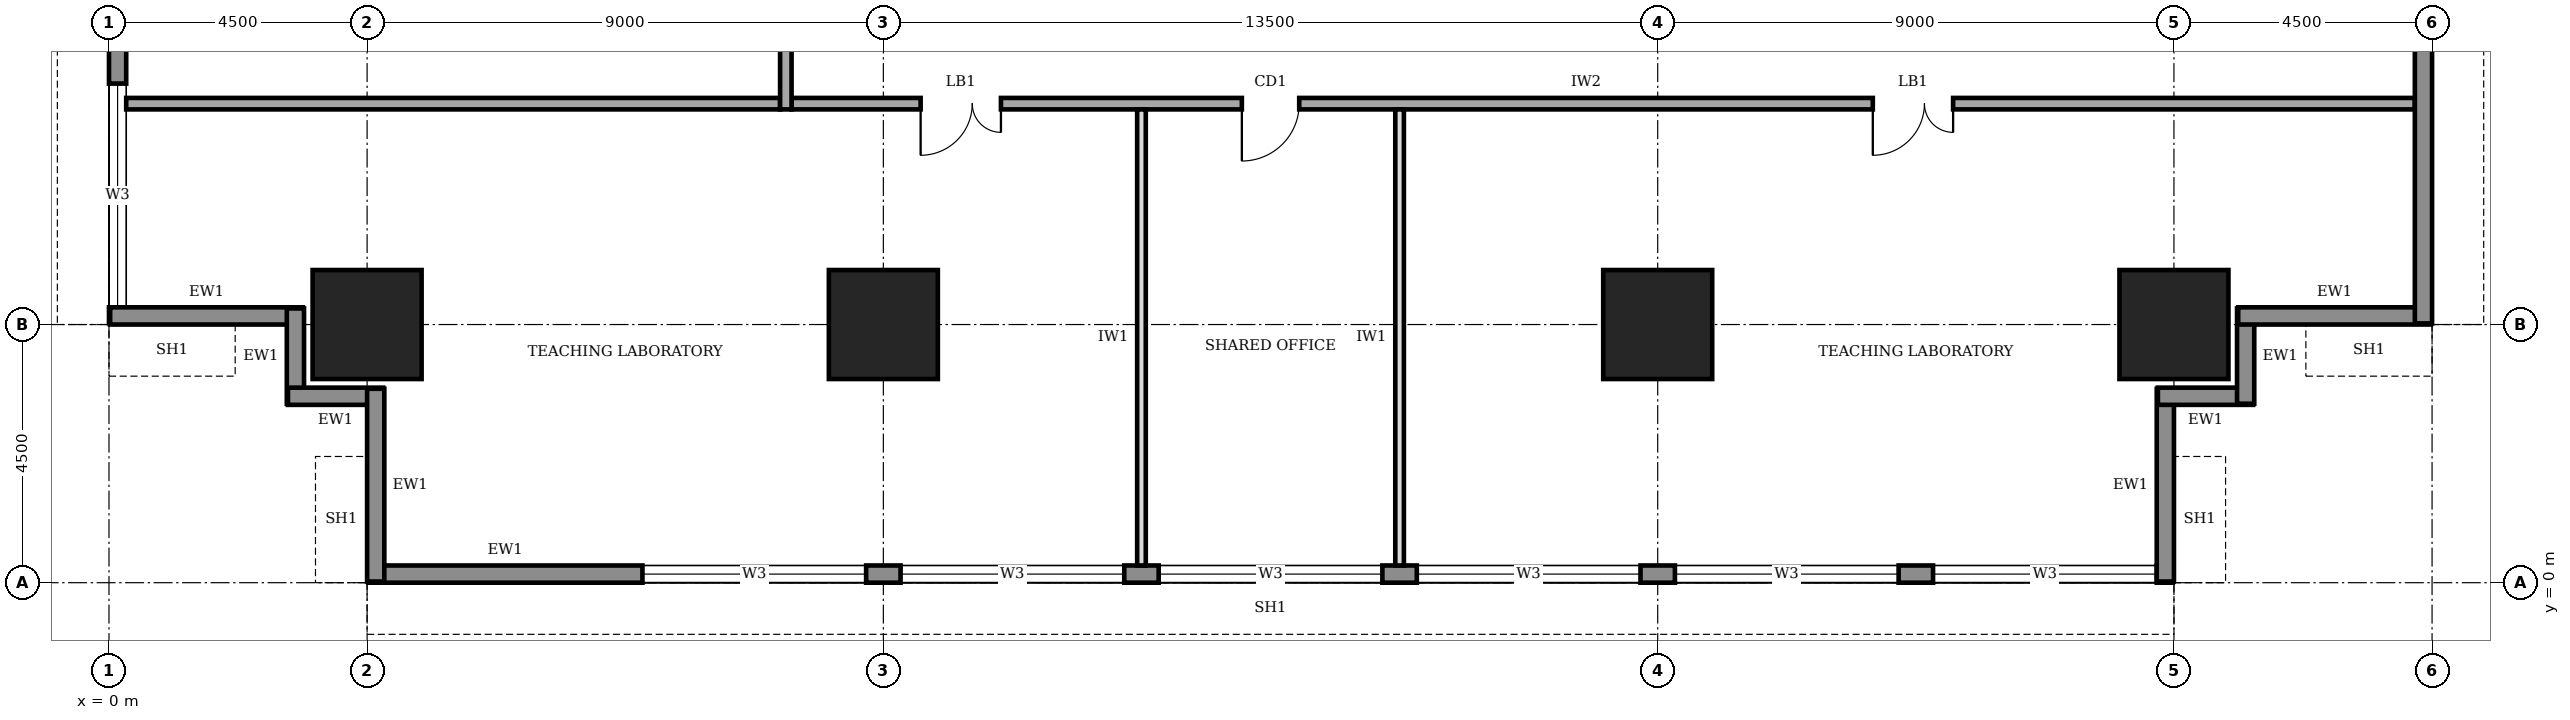
"""IFC4 building model, lengths in metres.
Left out: names, types, materials, properties, quantities, classifications, styles, units other than length and angle.
Written with IfcOpenShell. Run it as: python <this file> out.ifc"""

import sys

from ifc_helpers import new_model, si_unit, direction, frame, frame_2d, origin, origin_2d, place, context, subcontext, project, spatial, rectangle, extrude, element, fill, save


model = new_model("IFC4")
c1 = context("Model", 3, precision=1e-05, world=origin(), true_north=direction((0.0, 1.0)))
c2 = subcontext(c1, "Body", "Model", "MODEL_VIEW")
j1 = project(units=[si_unit("LENGTHUNIT", "METRE"), si_unit("PLANEANGLEUNIT", "RADIAN")], contexts=[c1])
p1 = place(None, origin())
s1 = spatial("IfcSite", under=j1, at=p1, CompositionType="ELEMENT")
p2 = place(p1, origin())
s2 = spatial("IfcBuilding", under=s1, at=p2, CompositionType="ELEMENT")
p3 = place(p2, frame((0.0, 0.0, 101.0)))
s3 = spatial("IfcBuildingStorey", under=s2, at=p3, CompositionType="ELEMENT", Elevation=101.0)
for number, where, z_axis, x_axis in (
    (1, (4.5, 4.5, 0.0), (0.0, 0.0, 1.0), (1.0, 0.0, 0.0)),
    (2, (13.5, 4.5, 0.0), (0.0, 0.0, 1.0), (1.0, 0.0, 0.0)),
    (3, (27.0, 4.5, 0.0), (0.0, 0.0, 1.0), (1.0, 0.0, 0.0)),
    (4, (36.0, 4.5, 0.0), (0.0, 0.0, 1.0), (1.0, 0.0, 0.0)),
):
    element("IfcColumn", number, at=place(p3, frame(where, z_axis=z_axis, x_axis=x_axis)), inside=s3, PredefinedType="COLUMN", context=c2, shape_type="SweptSolid", body=[
        extrude(rectangle(XDim=1.9, YDim=1.9, at=origin_2d()), origin(), (0.0, 0.0, 1.0), 4.0),
    ])
p4 = place(p3, frame((4.52, 0.15, 0.0), z_axis=(0.0, 0.0, 1.0), x_axis=(1.0, 0.0, 0.0)))
e5 = element("IfcWall", 5, at=p4, inside=s3, PredefinedType="STANDARD", context=c2, shape_type="SweptSolid", body=[
    extrude(rectangle(XDim=31.46, YDim=0.3, at=frame_2d((15.73, 0.0))), origin(), (0.0, 0.0, 1.0), 3.75),
])
p5 = place(p4, frame((4.78, 0.0, 0.95)))
e6 = element("IfcOpeningElement", 6, at=p5, cuts=e5, PredefinedType="OPENING", context=c2, shape_type="SweptSolid", body=[
    extrude(rectangle(XDim=3.9, YDim=1.8, at=frame_2d((1.95, 0.9))), frame((0.0, 0.16, 0.0), z_axis=(0.0, -1.0, 0.0), x_axis=(1.0, 0.0, 0.0)), (0.0, 0.0, 1.0), 0.32),
])
p6 = place(p4, frame((9.28, 0.0, 0.95)))
e7 = element("IfcOpeningElement", 7, at=p6, cuts=e5, PredefinedType="OPENING", context=c2, shape_type="SweptSolid", body=[
    extrude(rectangle(XDim=3.9, YDim=1.8, at=frame_2d((1.95, 0.9))), frame((0.0, 0.16, 0.0), z_axis=(0.0, -1.0, 0.0), x_axis=(1.0, 0.0, 0.0)), (0.0, 0.0, 1.0), 0.32),
])
p7 = place(p4, frame((13.78, 0.0, 0.95)))
e8 = element("IfcOpeningElement", 8, at=p7, cuts=e5, PredefinedType="OPENING", context=c2, shape_type="SweptSolid", body=[
    extrude(rectangle(XDim=3.9, YDim=1.8, at=frame_2d((1.95, 0.9))), frame((0.0, 0.16, 0.0), z_axis=(0.0, -1.0, 0.0), x_axis=(1.0, 0.0, 0.0)), (0.0, 0.0, 1.0), 0.32),
])
p8 = place(p4, frame((18.28, 0.0, 0.95)))
e9 = element("IfcOpeningElement", 9, at=p8, cuts=e5, PredefinedType="OPENING", context=c2, shape_type="SweptSolid", body=[
    extrude(rectangle(XDim=3.9, YDim=1.8, at=frame_2d((1.95, 0.9))), frame((0.0, 0.16, 0.0), z_axis=(0.0, -1.0, 0.0), x_axis=(1.0, 0.0, 0.0)), (0.0, 0.0, 1.0), 0.32),
])
p9 = place(p4, frame((22.78, 0.0, 0.95)))
e10 = element("IfcOpeningElement", 10, at=p9, cuts=e5, PredefinedType="OPENING", context=c2, shape_type="SweptSolid", body=[
    extrude(rectangle(XDim=3.9, YDim=1.8, at=frame_2d((1.95, 0.9))), frame((0.0, 0.16, 0.0), z_axis=(0.0, -1.0, 0.0), x_axis=(1.0, 0.0, 0.0)), (0.0, 0.0, 1.0), 0.32),
])
p10 = place(p4, frame((27.28, 0.0, 0.95)))
e11 = element("IfcOpeningElement", 11, at=p10, cuts=e5, PredefinedType="OPENING", context=c2, shape_type="SweptSolid", body=[
    extrude(rectangle(XDim=3.9, YDim=1.8, at=frame_2d((1.95, 0.9))), frame((0.0, 0.16, 0.0), z_axis=(0.0, -1.0, 0.0), x_axis=(1.0, 0.0, 0.0)), (0.0, 0.0, 1.0), 0.32),
])
p11 = place(p3, frame((35.85, 0.02, 0.0), z_axis=(0.0, 0.0, 1.0), x_axis=(0.0, 1.0, 0.0)))
e12 = element("IfcWall", 12, at=p11, inside=s3, PredefinedType="STANDARD", context=c2, shape_type="SweptSolid", body=[
    extrude(rectangle(XDim=3.36, YDim=0.3, at=frame_2d((1.68, 0.0))), origin(), (0.0, 0.0, 1.0), 2.85),
])
for number, where, z_axis, x_axis in (
    (13, (35.72, 3.25, 0.0), (0.0, 0.0, 1.0), (1.0, 0.0, 0.0)),
    (14, (37.25, 3.12, 0.0), (0.0, 0.0, 1.0), (0.0, 1.0, 0.0)),
):
    element("IfcWall", number, at=place(p3, frame(where, z_axis=z_axis, x_axis=x_axis)), inside=s3, PredefinedType="STANDARD", context=c2, shape_type="SweptSolid", body=[
        extrude(rectangle(XDim=1.66, YDim=0.3, at=frame_2d((0.83, 0.0))), origin(), (0.0, 0.0, 1.0), 3.75),
    ])
p12 = place(p3, frame((37.12, 4.65, 0.0), z_axis=(0.0, 0.0, 1.0), x_axis=(1.0, 0.0, 0.0)))
e15 = element("IfcWall", 15, at=p12, inside=s3, PredefinedType="STANDARD", context=c2, shape_type="SweptSolid", body=[
    extrude(rectangle(XDim=3.36, YDim=0.3, at=frame_2d((1.68, 0.0))), origin(), (0.0, 0.0, 1.0), 2.85),
])
p13 = place(p3, frame((40.35, 4.52, 0.0), z_axis=(0.0, 0.0, 1.0), x_axis=(0.0, 1.0, 0.0)))
e16 = element("IfcWall", 16, at=p13, inside=s3, PredefinedType="STANDARD", context=c2, shape_type="SweptSolid", body=[
    extrude(rectangle(XDim=6.73, YDim=0.3, at=frame_2d((3.365, 0.0))), origin(), (0.0, 0.0, 1.0), 3.75),
])
p14 = place(p3, frame((0.15, 35.98, 0.0), z_axis=(0.0, 0.0, 1.0), x_axis=(0.0, -1.0, 0.0)))
e17 = element("IfcWall", 17, at=p14, inside=s3, PredefinedType="STANDARD", context=c2, shape_type="SweptSolid", body=[
    extrude(rectangle(XDim=31.46, YDim=0.3, at=frame_2d((15.73, 0.0))), origin(), (0.0, 0.0, 1.0), 3.75),
])
p15 = place(p14, frame((27.28, 0.0, 0.95)))
e18 = element("IfcOpeningElement", 18, at=p15, cuts=e17, PredefinedType="OPENING", context=c2, shape_type="SweptSolid", body=[
    extrude(rectangle(XDim=3.9, YDim=1.8, at=frame_2d((1.95, 0.9))), frame((0.0, 0.16, 0.0), z_axis=(0.0, -1.0, 0.0), x_axis=(1.0, 0.0, 0.0)), (0.0, 0.0, 1.0), 0.32),
])
p16 = place(p14, frame((22.78, 0.0, 0.95)))
e19 = element("IfcOpeningElement", 19, at=p16, cuts=e17, PredefinedType="OPENING", context=c2, shape_type="SweptSolid", body=[
    extrude(rectangle(XDim=3.9, YDim=1.8, at=frame_2d((1.95, 0.9))), frame((0.0, 0.16, 0.0), z_axis=(0.0, -1.0, 0.0), x_axis=(1.0, 0.0, 0.0)), (0.0, 0.0, 1.0), 0.32),
])
p17 = place(p14, frame((18.28, 0.0, 0.95)))
e20 = element("IfcOpeningElement", 20, at=p17, cuts=e17, PredefinedType="OPENING", context=c2, shape_type="SweptSolid", body=[
    extrude(rectangle(XDim=3.9, YDim=1.8, at=frame_2d((1.95, 0.9))), frame((0.0, 0.16, 0.0), z_axis=(0.0, -1.0, 0.0), x_axis=(1.0, 0.0, 0.0)), (0.0, 0.0, 1.0), 0.32),
])
p18 = place(p14, frame((13.78, 0.0, 0.95)))
e21 = element("IfcOpeningElement", 21, at=p18, cuts=e17, PredefinedType="OPENING", context=c2, shape_type="SweptSolid", body=[
    extrude(rectangle(XDim=3.9, YDim=1.8, at=frame_2d((1.95, 0.9))), frame((0.0, 0.16, 0.0), z_axis=(0.0, -1.0, 0.0), x_axis=(1.0, 0.0, 0.0)), (0.0, 0.0, 1.0), 0.32),
])
p19 = place(p14, frame((9.28, 0.0, 0.95)))
e22 = element("IfcOpeningElement", 22, at=p19, cuts=e17, PredefinedType="OPENING", context=c2, shape_type="SweptSolid", body=[
    extrude(rectangle(XDim=3.9, YDim=1.8, at=frame_2d((1.95, 0.9))), frame((0.0, 0.16, 0.0), z_axis=(0.0, -1.0, 0.0), x_axis=(1.0, 0.0, 0.0)), (0.0, 0.0, 1.0), 0.32),
])
p20 = place(p14, frame((4.78, 0.0, 0.95)))
e23 = element("IfcOpeningElement", 23, at=p20, cuts=e17, PredefinedType="OPENING", context=c2, shape_type="SweptSolid", body=[
    extrude(rectangle(XDim=3.9, YDim=1.8, at=frame_2d((1.95, 0.9))), frame((0.0, 0.16, 0.0), z_axis=(0.0, -1.0, 0.0), x_axis=(1.0, 0.0, 0.0)), (0.0, 0.0, 1.0), 0.32),
])
p21 = place(p3, frame((0.02, 4.65, 0.0), z_axis=(0.0, 0.0, 1.0), x_axis=(1.0, 0.0, 0.0)))
e24 = element("IfcWall", 24, at=p21, inside=s3, PredefinedType="STANDARD", context=c2, shape_type="SweptSolid", body=[
    extrude(rectangle(XDim=3.36, YDim=0.3, at=frame_2d((1.68, 0.0))), origin(), (0.0, 0.0, 1.0), 2.85),
])
for number, where, z_axis, x_axis in (
    (25, (3.25, 4.78, 0.0), (0.0, 0.0, 1.0), (0.0, -1.0, 0.0)),
    (26, (3.12, 3.25, 0.0), (0.0, 0.0, 1.0), (1.0, 0.0, 0.0)),
):
    element("IfcWall", number, at=place(p3, frame(where, z_axis=z_axis, x_axis=x_axis)), inside=s3, PredefinedType="STANDARD", context=c2, shape_type="SweptSolid", body=[
        extrude(rectangle(XDim=1.66, YDim=0.3, at=frame_2d((0.83, 0.0))), origin(), (0.0, 0.0, 1.0), 3.75),
    ])
p22 = place(p3, frame((4.65, 3.38, 0.0), z_axis=(0.0, 0.0, 1.0), x_axis=(0.0, -1.0, 0.0)))
e27 = element("IfcWall", 27, at=p22, inside=s3, PredefinedType="STANDARD", context=c2, shape_type="SweptSolid", body=[
    extrude(rectangle(XDim=3.36, YDim=0.3, at=frame_2d((1.68, 0.0))), origin(), (0.0, 0.0, 1.0), 2.85),
])
p23 = place(p3, frame((11.9, 8.35, 0.0), z_axis=(0.0, 0.0, 1.0), x_axis=(1.0, 0.0, 0.0)))
e28 = element("IfcWall", 28, at=p23, inside=s3, PredefinedType="SOLIDWALL", context=c2, shape_type="SweptSolid", body=[
    extrude(rectangle(XDim=28.3, YDim=0.2, at=frame_2d((14.15, 0.0))), origin(), (0.0, 0.0, 1.0), 3.75),
])
p24 = place(p23, frame((2.25, 0.0, 0.0)))
e29 = element("IfcOpeningElement", 29, at=p24, cuts=e28, PredefinedType="OPENING", context=c2, shape_type="SweptSolid", body=[
    extrude(rectangle(XDim=1.4, YDim=2.1, at=frame_2d((0.7, 1.05))), frame((0.0, 0.11, 0.0), z_axis=(0.0, -1.0, 0.0), x_axis=(1.0, 0.0, 0.0)), (0.0, 0.0, 1.0), 0.22),
])
p25 = place(p23, frame((7.85, 0.0, 0.0)))
e30 = element("IfcOpeningElement", 30, at=p25, cuts=e28, PredefinedType="OPENING", context=c2, shape_type="SweptSolid", body=[
    extrude(rectangle(XDim=1.0, YDim=2.1, at=frame_2d((0.5, 1.05))), frame((0.0, 0.11, 0.0), z_axis=(0.0, -1.0, 0.0), x_axis=(1.0, 0.0, 0.0)), (0.0, 0.0, 1.0), 0.22),
])
p26 = place(p23, frame((18.85, 0.0, 0.0)))
e31 = element("IfcOpeningElement", 31, at=p26, cuts=e28, PredefinedType="OPENING", context=c2, shape_type="SweptSolid", body=[
    extrude(rectangle(XDim=1.4, YDim=2.1, at=frame_2d((0.7, 1.05))), frame((0.0, 0.11, 0.0), z_axis=(0.0, -1.0, 0.0), x_axis=(1.0, 0.0, 0.0)), (0.0, 0.0, 1.0), 0.22),
])
p27 = place(p3, frame((11.8, 32.05, 0.0), z_axis=(0.0, 0.0, 1.0), x_axis=(0.0, -1.0, 0.0)))
e32 = element("IfcWall", 32, at=p27, inside=s3, PredefinedType="SOLIDWALL", context=c2, shape_type="SweptSolid", body=[
    extrude(rectangle(XDim=23.8, YDim=0.2, at=frame_2d((11.9, 0.0))), origin(), (0.0, 0.0, 1.0), 3.75),
])
p28 = place(p27, frame((20.675, 0.0, 0.0)))
e33 = element("IfcOpeningElement", 33, at=p28, cuts=e32, PredefinedType="OPENING", context=c2, shape_type="SweptSolid", body=[
    extrude(rectangle(XDim=1.0, YDim=2.1, at=frame_2d((0.5, 1.05))), frame((0.0, 0.11, 0.0), z_axis=(0.0, -1.0, 0.0), x_axis=(1.0, 0.0, 0.0)), (0.0, 0.0, 1.0), 0.22),
])
p29 = place(p27, frame((16.2, 0.0, 0.0)))
e34 = element("IfcOpeningElement", 34, at=p29, cuts=e32, PredefinedType="OPENING", context=c2, shape_type="SweptSolid", body=[
    extrude(rectangle(XDim=0.9, YDim=2.1, at=frame_2d((0.45, 1.05))), frame((0.0, 0.11, 0.0), z_axis=(0.0, -1.0, 0.0), x_axis=(1.0, 0.0, 0.0)), (0.0, 0.0, 1.0), 0.22),
])
p30 = place(p27, frame((13.2, 0.0, 0.0)))
e35 = element("IfcOpeningElement", 35, at=p30, cuts=e32, PredefinedType="OPENING", context=c2, shape_type="SweptSolid", body=[
    extrude(rectangle(XDim=0.9, YDim=2.1, at=frame_2d((0.45, 1.05))), frame((0.0, 0.11, 0.0), z_axis=(0.0, -1.0, 0.0), x_axis=(1.0, 0.0, 0.0)), (0.0, 0.0, 1.0), 0.22),
])
p31 = place(p27, frame((8.35, 0.0, 0.0)))
e36 = element("IfcOpeningElement", 36, at=p31, cuts=e32, PredefinedType="OPENING", context=c2, shape_type="SweptSolid", body=[
    extrude(rectangle(XDim=0.9, YDim=2.1, at=frame_2d((0.45, 1.05))), frame((0.0, 0.11, 0.0), z_axis=(0.0, -1.0, 0.0), x_axis=(1.0, 0.0, 0.0)), (0.0, 0.0, 1.0), 0.22),
])
p32 = place(p27, frame((5.55, 0.0, 0.0)))
e37 = element("IfcOpeningElement", 37, at=p32, cuts=e32, PredefinedType="OPENING", context=c2, shape_type="SweptSolid", body=[
    extrude(rectangle(XDim=1.0, YDim=2.1, at=frame_2d((0.5, 1.05))), frame((0.0, 0.11, 0.0), z_axis=(0.0, -1.0, 0.0), x_axis=(1.0, 0.0, 0.0)), (0.0, 0.0, 1.0), 0.22),
])
p33 = place(p27, frame((11.05, 0.0, 0.0)))
e38 = element("IfcOpeningElement", 38, at=p33, cuts=e32, PredefinedType="OPENING", context=c2, shape_type="SweptSolid", body=[
    extrude(rectangle(XDim=1.0, YDim=2.1, at=frame_2d((0.5, 1.05))), frame((0.0, 0.11, 0.0), z_axis=(0.0, -1.0, 0.0), x_axis=(1.0, 0.0, 0.0)), (0.0, 0.0, 1.0), 0.22),
])
p34 = place(p27, frame((1.925, 0.0, 0.0)))
e39 = element("IfcOpeningElement", 39, at=p34, cuts=e32, PredefinedType="OPENING", context=c2, shape_type="SweptSolid", body=[
    extrude(rectangle(XDim=1.0, YDim=2.1, at=frame_2d((0.5, 1.05))), frame((0.0, 0.11, 0.0), z_axis=(0.0, -1.0, 0.0), x_axis=(1.0, 0.0, 0.0)), (0.0, 0.0, 1.0), 0.22),
])
p35 = place(p3, frame((0.3, 8.35, 0.0), z_axis=(0.0, 0.0, 1.0), x_axis=(1.0, 0.0, 0.0)))
e40 = element("IfcWall", 40, at=p35, inside=s3, PredefinedType="SOLIDWALL", context=c2, shape_type="SweptSolid", body=[
    extrude(rectangle(XDim=11.4, YDim=0.2, at=frame_2d((5.7, 0.0))), origin(), (0.0, 0.0, 1.0), 3.75),
])
for number, where, z_axis, x_axis in (
    (41, (18.0, 0.3, 0.0), (0.0, 0.0, 1.0), (0.0, 1.0, 0.0)),
    (42, (22.5, 0.3, 0.0), (0.0, 0.0, 1.0), (0.0, 1.0, 0.0)),
):
    element("IfcWall", number, at=place(p3, frame(where, z_axis=z_axis, x_axis=x_axis)), inside=s3, PredefinedType="PARTITIONING", context=c2, shape_type="SweptSolid", body=[
        extrude(rectangle(XDim=7.95, YDim=0.15, at=frame_2d((3.975, 0.0))), origin(), (0.0, 0.0, 1.0), 3.75),
    ])
p36 = place(p5, origin())
e43 = element("IfcWindow", 43, at=p36, inside=s3, PartitioningType="SINGLE_PANEL", PredefinedType="WINDOW", context=c2, shape_type="SweptSolid", body=[
    extrude(rectangle(XDim=3.9, YDim=1.8, at=frame_2d((1.95, 0.9))), frame((0.0, 0.03, 0.0), z_axis=(0.0, -1.0, 0.0), x_axis=(1.0, 0.0, 0.0)), (0.0, 0.0, 1.0), 0.06),
])
fill(e6, e43)
p37 = place(p6, origin())
e44 = element("IfcWindow", 44, at=p37, inside=s3, PartitioningType="SINGLE_PANEL", PredefinedType="WINDOW", context=c2, shape_type="SweptSolid", body=[
    extrude(rectangle(XDim=3.9, YDim=1.8, at=frame_2d((1.95, 0.9))), frame((0.0, 0.03, 0.0), z_axis=(0.0, -1.0, 0.0), x_axis=(1.0, 0.0, 0.0)), (0.0, 0.0, 1.0), 0.06),
])
fill(e7, e44)
p38 = place(p7, origin())
e45 = element("IfcWindow", 45, at=p38, inside=s3, PartitioningType="SINGLE_PANEL", PredefinedType="WINDOW", context=c2, shape_type="SweptSolid", body=[
    extrude(rectangle(XDim=3.9, YDim=1.8, at=frame_2d((1.95, 0.9))), frame((0.0, 0.03, 0.0), z_axis=(0.0, -1.0, 0.0), x_axis=(1.0, 0.0, 0.0)), (0.0, 0.0, 1.0), 0.06),
])
fill(e8, e45)
p39 = place(p8, origin())
e46 = element("IfcWindow", 46, at=p39, inside=s3, PartitioningType="SINGLE_PANEL", PredefinedType="WINDOW", context=c2, shape_type="SweptSolid", body=[
    extrude(rectangle(XDim=3.9, YDim=1.8, at=frame_2d((1.95, 0.9))), frame((0.0, 0.03, 0.0), z_axis=(0.0, -1.0, 0.0), x_axis=(1.0, 0.0, 0.0)), (0.0, 0.0, 1.0), 0.06),
])
fill(e9, e46)
p40 = place(p9, origin())
e47 = element("IfcWindow", 47, at=p40, inside=s3, PartitioningType="SINGLE_PANEL", PredefinedType="WINDOW", context=c2, shape_type="SweptSolid", body=[
    extrude(rectangle(XDim=3.9, YDim=1.8, at=frame_2d((1.95, 0.9))), frame((0.0, 0.03, 0.0), z_axis=(0.0, -1.0, 0.0), x_axis=(1.0, 0.0, 0.0)), (0.0, 0.0, 1.0), 0.06),
])
fill(e10, e47)
p41 = place(p10, origin())
e48 = element("IfcWindow", 48, at=p41, inside=s3, PartitioningType="SINGLE_PANEL", PredefinedType="WINDOW", context=c2, shape_type="SweptSolid", body=[
    extrude(rectangle(XDim=3.9, YDim=1.8, at=frame_2d((1.95, 0.9))), frame((0.0, 0.03, 0.0), z_axis=(0.0, -1.0, 0.0), x_axis=(1.0, 0.0, 0.0)), (0.0, 0.0, 1.0), 0.06),
])
fill(e11, e48)
p42 = place(p15, origin())
e49 = element("IfcWindow", 49, at=p42, inside=s3, PartitioningType="SINGLE_PANEL", PredefinedType="WINDOW", context=c2, shape_type="SweptSolid", body=[
    extrude(rectangle(XDim=3.9, YDim=1.8, at=frame_2d((1.95, 0.9))), frame((0.0, 0.03, 0.0), z_axis=(0.0, -1.0, 0.0), x_axis=(1.0, 0.0, 0.0)), (0.0, 0.0, 1.0), 0.06),
])
fill(e18, e49)
p43 = place(p24, frame((1.4, 0.0, 0.0), z_axis=(0.0, 0.0, 1.0), x_axis=(-1.0, 0.0, 0.0)))
e50 = element("IfcDoor", 50, at=p43, inside=s3, OperationType="DOUBLE_DOOR_SINGLE_SWING", PredefinedType="DOOR", context=c2, shape_type="SweptSolid", body=[
    extrude(rectangle(XDim=1.4, YDim=2.1, at=frame_2d((0.7, 1.05))), frame((0.0, 0.025, 0.0), z_axis=(0.0, -1.0, 0.0), x_axis=(1.0, 0.0, 0.0)), (0.0, 0.0, 1.0), 0.05),
])
fill(e29, e50)
p44 = place(p25, frame((1.0, 0.0, 0.0), z_axis=(0.0, 0.0, 1.0), x_axis=(-1.0, 0.0, 0.0)))
e51 = element("IfcDoor", 51, at=p44, inside=s3, OperationType="SINGLE_SWING_RIGHT", PredefinedType="DOOR", context=c2, shape_type="SweptSolid", body=[
    extrude(rectangle(XDim=1.0, YDim=2.1, at=frame_2d((0.5, 1.05))), frame((0.0, 0.025, 0.0), z_axis=(0.0, -1.0, 0.0), x_axis=(1.0, 0.0, 0.0)), (0.0, 0.0, 1.0), 0.05),
])
fill(e30, e51)
p45 = place(p26, frame((1.4, 0.0, 0.0), z_axis=(0.0, 0.0, 1.0), x_axis=(-1.0, 0.0, 0.0)))
e52 = element("IfcDoor", 52, at=p45, inside=s3, OperationType="DOUBLE_DOOR_SINGLE_SWING", PredefinedType="DOOR", context=c2, shape_type="SweptSolid", body=[
    extrude(rectangle(XDim=1.4, YDim=2.1, at=frame_2d((0.7, 1.05))), frame((0.0, 0.025, 0.0), z_axis=(0.0, -1.0, 0.0), x_axis=(1.0, 0.0, 0.0)), (0.0, 0.0, 1.0), 0.05),
])
fill(e31, e52)
save(model, sys.argv[1])
